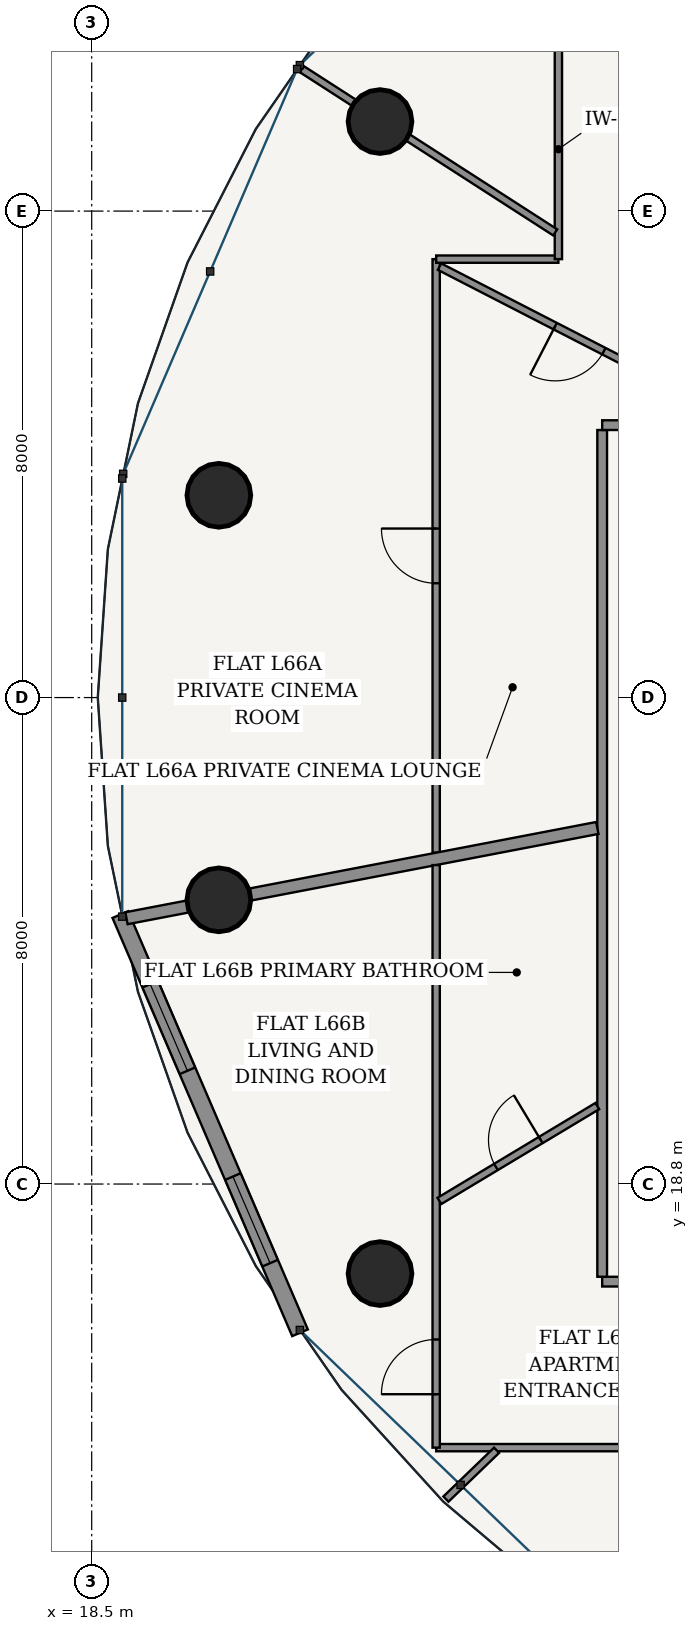
"""IFC4 building model, lengths in metres.
Left out: names, types, materials, properties, quantities, classifications, styles, units other than length and angle.
Written with IfcOpenShell. Run it as: python <this file> out.ifc"""

import sys

from ifc_helpers import new_model, si_unit, direction, frame, frame_2d, origin, origin_2d, place, context, subcontext, project, spatial, rectangle, hollow_circle, extrude, source, transform, mapped, element, fill, save


model = new_model("IFC4")
c1 = context("Model", 3, precision=1e-05, world=origin(), true_north=direction((-0.2419218956, 0.970295726276)))
c2 = subcontext(c1, "Body", "Model", "MODEL_VIEW")
j1 = project(units=[si_unit("LENGTHUNIT", "METRE"), si_unit("PLANEANGLEUNIT", "RADIAN")], contexts=[c1])
p1 = place(None, origin())
s1 = spatial("IfcSite", under=j1, at=p1, CompositionType="ELEMENT")
p2 = place(p1, origin())
s2 = spatial("IfcBuilding", under=s1, at=p2, CompositionType="ELEMENT")
p3 = place(p2, frame((0.0, 0.0, 251.95)))
s3 = spatial("IfcBuildingStorey", under=s2, at=p3, CompositionType="ELEMENT", Elevation=251.95)
for number, where, z_axis, x_axis in (
    (1, (23.241, 36.272, 0.0), (0.0, 0.0, 1.0), (1.0, 0.0, 0.0)),
    (2, (20.591, 30.126, 0.0), (0.0, 0.0, 1.0), (1.0, 0.0, 0.0)),
    (3, (20.591, 23.474, 0.0), (0.0, 0.0, 1.0), (1.0, 0.0, 0.0)),
    (4, (23.241, 17.328, 0.0), (0.0, 0.0, 1.0), (1.0, 0.0, 0.0)),
):
    element("IfcColumn", number, at=place(p3, frame(where, z_axis=z_axis, x_axis=x_axis)), inside=s3, PredefinedType="COLUMN", context=c2, shape_type="SweptSolid", body=[
        extrude(hollow_circle(Radius=0.525, WallThickness=0.035, at=origin_2d()), origin(), (0.0, 0.0, 1.0), 3.75),
    ])
p4 = place(p3, frame((18.971, 23.231, 0.0), z_axis=(0.0, 0.0, 1.0), x_axis=(0.394816612978, -0.918759948037, 0.0)))
e5 = element("IfcWall", 5, at=p4, inside=s3, PredefinedType="SOLIDWALL", context=c2, shape_type="SweptSolid", body=[
    extrude(rectangle(XDim=7.485, YDim=0.28, at=frame_2d((3.743, 0.0))), origin(), (0.0, 0.0, 1.0), 3.49),
])
p5 = place(p4, frame((1.246, 0.0, 0.85)))
e6 = element("IfcOpeningElement", 6, at=p5, cuts=e5, PredefinedType="OPENING", context=c2, shape_type="SweptSolid", body=[
    extrude(rectangle(XDim=1.55, YDim=1.95, at=frame_2d((0.775, 0.975))), frame((0.0, 0.15, 0.0), z_axis=(0.0, -1.0, 0.0), x_axis=(1.0, 0.0, 0.0)), (0.0, 0.0, 1.0), 0.3),
])
p6 = place(p4, frame((4.689, 0.0, 0.85)))
e7 = element("IfcOpeningElement", 7, at=p6, cuts=e5, PredefinedType="OPENING", context=c2, shape_type="SweptSolid", body=[
    extrude(rectangle(XDim=1.55, YDim=1.95, at=frame_2d((0.775, 0.975))), frame((0.0, 0.15, 0.0), z_axis=(0.0, -1.0, 0.0), x_axis=(1.0, 0.0, 0.0)), (0.0, 0.0, 1.0), 0.3),
])
p7 = place(p3, frame((26.895, 17.195, 0.0), z_axis=(0.0, 0.0, 1.0), x_axis=(1.0, 0.0, 0.0)))
e8 = element("IfcWall", 8, at=p7, inside=s3, PredefinedType="PARTITIONING", context=c2, shape_type="SweptSolid", body=[
    extrude(rectangle(XDim=22.21, YDim=0.16, at=frame_2d((11.105, 0.0))), origin(), (0.0, 0.0, 1.0), 3.015),
])
p8 = place(p7, frame((2.861, 0.0, 0.0)))
e9 = element("IfcOpeningElement", 9, at=p8, cuts=e8, PredefinedType="OPENING", context=c2, shape_type="SweptSolid", body=[
    extrude(rectangle(XDim=0.98, YDim=2.2, at=frame_2d((0.49, 1.1))), frame((0.0, 0.09, 0.0), z_axis=(0.0, -1.0, 0.0), x_axis=(1.0, 0.0, 0.0)), (0.0, 0.0, 1.0), 0.18),
])
p9 = place(p7, frame((16.97, 0.0, 0.0)))
e10 = element("IfcOpeningElement", 10, at=p9, cuts=e8, PredefinedType="OPENING", context=c2, shape_type="SweptSolid", body=[
    extrude(rectangle(XDim=0.98, YDim=2.2, at=frame_2d((0.49, 1.1))), frame((0.0, 0.09, 0.0), z_axis=(0.0, -1.0, 0.0), x_axis=(1.0, 0.0, 0.0)), (0.0, 0.0, 1.0), 0.18),
])
p10 = place(p3, frame((26.895, 17.275, 0.0), z_axis=(0.0, 0.0, 1.0), x_axis=(0.0, 1.0, 0.0)))
e11 = element("IfcWall", 11, at=p10, inside=s3, PredefinedType="PARTITIONING", context=c2, shape_type="SweptSolid", body=[
    extrude(rectangle(XDim=13.925, YDim=0.16, at=frame_2d((6.962, 0.0))), origin(), (0.0, 0.0, 1.0), 3.015),
])
p11 = place(p3, frame((26.895, 31.28, 0.0), z_axis=(0.0, 0.0, 1.0), x_axis=(1.0, 0.0, 0.0)))
e12 = element("IfcWall", 12, at=p11, inside=s3, PredefinedType="PARTITIONING", context=c2, shape_type="SweptSolid", body=[
    extrude(rectangle(XDim=1.93, YDim=0.16, at=frame_2d((0.965, 0.0))), origin(), (0.0, 0.0, 1.0), 3.49),
])
p12 = place(p3, frame((24.165, 24.249, 0.0), z_axis=(0.0, 0.0, 1.0), x_axis=(0.0, 1.0, 0.0)))
e13 = element("IfcWall", 13, at=p12, inside=s3, PredefinedType="PARTITIONING", context=c2, shape_type="SweptSolid", body=[
    extrude(rectangle(XDim=9.761, YDim=0.12, at=frame_2d((4.88, 0.0))), origin(), (0.0, 0.0, 1.0), 3.015),
])
p13 = place(p12, frame((4.43, 0.0, 0.0)))
e14 = element("IfcOpeningElement", 14, at=p13, cuts=e13, PredefinedType="OPENING", context=c2, shape_type="SweptSolid", body=[
    extrude(rectangle(XDim=0.9, YDim=2.15, at=frame_2d((0.45, 1.075))), frame((0.0, 0.07, 0.0), z_axis=(0.0, -1.0, 0.0), x_axis=(1.0, 0.0, 0.0)), (0.0, 0.0, 1.0), 0.14),
])
p14 = place(p3, frame((24.165, 34.01, 0.0), z_axis=(0.0, 0.0, 1.0), x_axis=(1.0, 0.0, 0.0)))
e15 = element("IfcWall", 15, at=p14, inside=s3, PredefinedType="PARTITIONING", context=c2, shape_type="SweptSolid", body=[
    extrude(rectangle(XDim=2.01, YDim=0.12, at=frame_2d((1.005, 0.0))), origin(), (0.0, 0.0, 1.0), 3.209),
])
p15 = place(p3, frame((26.175, 34.01, 0.0), z_axis=(0.0, 0.0, 1.0), x_axis=(0.0, 1.0, 0.0)))
e16 = element("IfcWall", 16, at=p15, inside=s3, PredefinedType="PARTITIONING", context=c2, shape_type="SweptSolid", body=[
    extrude(rectangle(XDim=3.615, YDim=0.12, at=frame_2d((1.808, 0.0))), origin(), (0.0, 0.0, 1.0), 3.015),
])
p16 = place(p3, frame((26.123, 34.45, 0.0), z_axis=(0.0, 0.0, 1.0), x_axis=(-0.840703033126, 0.541496454367, 0.0)))
e17 = element("IfcWall", 17, at=p16, inside=s3, PredefinedType="PARTITIONING", context=c2, shape_type="SweptSolid", body=[
    extrude(rectangle(XDim=4.958, YDim=0.12, at=frame_2d((2.479, 0.0))), origin(), (0.0, 0.0, 1.0), 3.015),
])
p17 = place(p3, frame((28.825, 31.518, 0.0), z_axis=(0.0, 0.0, 1.0), x_axis=(-0.889305882583, 0.457312854842, 0.0)))
e18 = element("IfcWall", 18, at=p17, inside=s3, PredefinedType="PARTITIONING", context=c2, shape_type="SweptSolid", body=[
    extrude(rectangle(XDim=5.178, YDim=0.12, at=frame_2d((2.589, 0.0))), origin(), (0.0, 0.0, 1.0), 3.209),
])
p18 = place(p17, frame((2.139, 0.0, 0.0)))
e19 = element("IfcOpeningElement", 19, at=p18, cuts=e18, PredefinedType="OPENING", context=c2, shape_type="SweptSolid", body=[
    extrude(rectangle(XDim=0.9, YDim=2.15, at=frame_2d((0.45, 1.075))), frame((0.0, 0.07, 0.0), z_axis=(0.0, -1.0, 0.0), x_axis=(1.0, 0.0, 0.0)), (0.0, 0.0, 1.0), 0.14),
])
p19 = place(p3, frame((26.815, 24.656, 0.0), z_axis=(0.0, 0.0, 1.0), x_axis=(-0.982109889803, -0.188308694305, 0.0)))
e20 = element("IfcWall", 20, at=p19, inside=s3, PredefinedType="PARTITIONING", context=c2, shape_type="SweptSolid", body=[
    extrude(rectangle(XDim=7.884, YDim=0.2, at=frame_2d((3.942, 0.0))), origin(), (0.0, 0.0, 1.0), 3.015),
])
p20 = place(p3, frame((35.353, 14.465, 0.0), z_axis=(0.0, 0.0, 1.0), x_axis=(-1.0, 0.0, 0.0)))
e21 = element("IfcWall", 21, at=p20, inside=s3, PredefinedType="PARTITIONING", context=c2, shape_type="SweptSolid", body=[
    extrude(rectangle(XDim=11.188, YDim=0.12, at=frame_2d((5.594, 0.0))), origin(), (0.0, 0.0, 1.0), 3.015),
])
p21 = place(p20, frame((2.049, 0.0, 0.0)))
e22 = element("IfcOpeningElement", 22, at=p21, cuts=e21, PredefinedType="OPENING", context=c2, shape_type="SweptSolid", body=[
    extrude(rectangle(XDim=0.9, YDim=2.15, at=frame_2d((0.45, 1.075))), frame((0.0, 0.07, 0.0), z_axis=(0.0, -1.0, 0.0), x_axis=(1.0, 0.0, 0.0)), (0.0, 0.0, 1.0), 0.14),
])
p22 = place(p3, frame((24.165, 14.465, 0.0), z_axis=(0.0, 0.0, 1.0), x_axis=(0.0, 1.0, 0.0)))
e23 = element("IfcWall", 23, at=p22, inside=s3, PredefinedType="PARTITIONING", context=c2, shape_type="SweptSolid", body=[
    extrude(rectangle(XDim=9.58, YDim=0.12, at=frame_2d((4.79, 0.0))), origin(), (0.0, 0.0, 1.0), 3.015),
])
p23 = place(p22, frame((0.879, 0.0, 0.0)))
e24 = element("IfcOpeningElement", 24, at=p23, cuts=e23, PredefinedType="OPENING", context=c2, shape_type="SweptSolid", body=[
    extrude(rectangle(XDim=0.9, YDim=2.15, at=frame_2d((0.45, 1.075))), frame((0.0, 0.07, 0.0), z_axis=(0.0, -1.0, 0.0), x_axis=(1.0, 0.0, 0.0)), (0.0, 0.0, 1.0), 0.14),
])
p24 = place(p3, frame((25.159, 14.422, 0.0), z_axis=(0.0, 0.0, 1.0), x_axis=(-0.720070222664, -0.693901199331, 0.0)))
e25 = element("IfcWall", 25, at=p24, inside=s3, PredefinedType="PARTITIONING", context=c2, shape_type="SweptSolid", body=[
    extrude(rectangle(XDim=1.157, YDim=0.12, at=frame_2d((0.578, 0.0))), origin(), (0.0, 0.0, 1.0), 3.49),
])
p25 = place(p3, frame((26.815, 20.082, 0.0), z_axis=(0.0, 0.0, 1.0), x_axis=(-0.857265264382, -0.514875000834, 0.0)))
e26 = element("IfcWall", 26, at=p25, inside=s3, PredefinedType="PARTITIONING", context=c2, shape_type="SweptSolid", body=[
    extrude(rectangle(XDim=3.029, YDim=0.12, at=frame_2d((1.515, 0.0))), origin(), (0.0, 0.0, 1.0), 3.209),
])
p26 = place(p25, frame((1.085, 0.0, 0.0)))
e27 = element("IfcOpeningElement", 27, at=p26, cuts=e26, PredefinedType="OPENING", context=c2, shape_type="SweptSolid", body=[
    extrude(rectangle(XDim=0.86, YDim=2.15, at=frame_2d((0.43, 1.075))), frame((0.0, 0.07, 0.0), z_axis=(0.0, -1.0, 0.0), x_axis=(1.0, 0.0, 0.0)), (0.0, 0.0, 1.0), 0.14),
])
m1 = source(origin(), c2, "Body", "SweptSolid", [
    extrude(rectangle(XDim=1.55, YDim=1.95, at=frame_2d((0.775, 0.975))), frame((0.0, 0.03, 0.0), z_axis=(0.0, -1.0, 0.0), x_axis=(1.0, 0.0, 0.0)), (0.0, 0.0, 1.0), 0.06),
])
p27 = place(p5, origin())
e28 = element("IfcWindow", 28, at=p27, inside=s3, PartitioningType="SINGLE_PANEL", PredefinedType="WINDOW", context=c2, shape_type="MappedRepresentation", body=[
    mapped(m1, transform((0.0, 0.0, 0.0), scale=1.0)),
])
fill(e6, e28)
p28 = place(p6, origin())
e29 = element("IfcWindow", 29, at=p28, inside=s3, PartitioningType="SINGLE_PANEL", PredefinedType="WINDOW", context=c2, shape_type="MappedRepresentation", body=[
    mapped(m1, transform((0.0, 0.0, 0.0), scale=1.0)),
])
fill(e7, e29)
m2 = source(origin(), c2, "Body", "SweptSolid", [
    extrude(rectangle(XDim=0.9, YDim=2.15, at=frame_2d((0.45, 1.075))), frame((0.0, 0.025, 0.0), z_axis=(0.0, -1.0, 0.0), x_axis=(1.0, 0.0, 0.0)), (0.0, 0.0, 1.0), 0.05),
])
p29 = place(p18, origin())
e30 = element("IfcDoor", 30, at=p29, inside=s3, OperationType="SINGLE_SWING_RIGHT", PredefinedType="DOOR", context=c2, shape_type="MappedRepresentation", body=[
    mapped(m2, transform((0.0, 0.0, 0.0), scale=1.0)),
])
fill(e19, e30)
p30 = place(p13, origin())
e31 = element("IfcDoor", 31, at=p30, inside=s3, OperationType="SINGLE_SWING_RIGHT", PredefinedType="DOOR", context=c2, shape_type="MappedRepresentation", body=[
    mapped(m2, transform((0.0, 0.0, 0.0), scale=1.0)),
])
fill(e14, e31)
m3 = source(origin(), c2, "Body", "SweptSolid", [
    extrude(rectangle(XDim=0.86, YDim=2.15, at=frame_2d((0.43, 1.075))), frame((0.0, 0.025, 0.0), z_axis=(0.0, -1.0, 0.0), x_axis=(1.0, 0.0, 0.0)), (0.0, 0.0, 1.0), 0.05),
])
p31 = place(p26, frame((0.86, 0.0, 0.0), z_axis=(0.0, 0.0, 1.0), x_axis=(-1.0, 0.0, 0.0)))
e32 = element("IfcDoor", 32, at=p31, inside=s3, OperationType="SINGLE_SWING_RIGHT", PredefinedType="DOOR", context=c2, shape_type="MappedRepresentation", body=[
    mapped(m3, transform((0.0, 0.0, 0.0), scale=1.0)),
])
fill(e27, e32)
p32 = place(p23, origin())
e33 = element("IfcDoor", 33, at=p32, inside=s3, OperationType="SINGLE_SWING_LEFT", PredefinedType="DOOR", context=c2, shape_type="MappedRepresentation", body=[
    mapped(m2, transform((0.0, 0.0, 0.0), scale=1.0)),
])
fill(e24, e33)
save(model, sys.argv[1])
